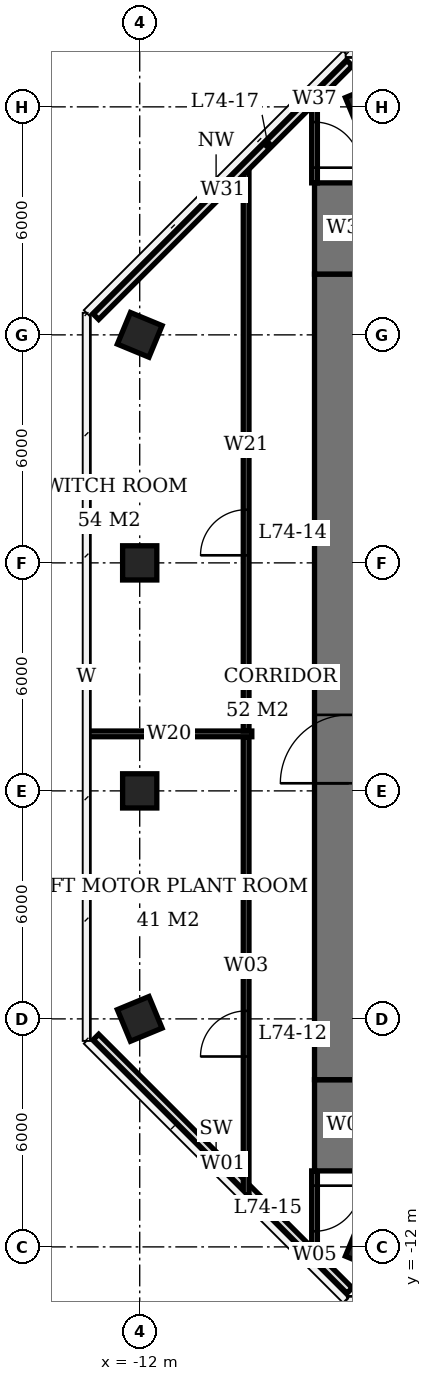
"""IFC4 building model, lengths in metres.
Left out: names, types, materials, properties, quantities, classifications, styles, units other than length and angle.
Written with IfcOpenShell. Run it as: python <this file> out.ifc"""

import sys

from ifc_helpers import new_model, si_unit, direction, frame, frame_2d, origin, origin_2d, place, context, subcontext, project, spatial, rectangle, extrude, element, fill, save


model = new_model("IFC4")
c1 = context("Model", 3, precision=1e-05, world=origin(), true_north=direction((0.0, 1.0)))
c2 = subcontext(c1, "Body", "Model", "MODEL_VIEW")
j1 = project(units=[si_unit("LENGTHUNIT", "METRE"), si_unit("PLANEANGLEUNIT", "RADIAN")], contexts=[c1])
p1 = place(None, origin())
s1 = spatial("IfcSite", under=j1, at=p1, CompositionType="ELEMENT")
p2 = place(p1, origin())
s2 = spatial("IfcBuilding", under=s1, at=p2, CompositionType="ELEMENT")
p3 = place(p2, frame((0.0, 0.0, 300.7)))
s3 = spatial("IfcBuildingStorey", under=s2, at=p3, CompositionType="ELEMENT", Elevation=300.7)
for number, where, z_axis, x_axis in (
    (1, (-12.0, -6.0, 0.0), (0.0, 0.0, 1.0), (-0.383, 0.924, 0.0)),
    (2, (-12.0, 0.0, 0.0), (0.0, 0.0, 1.0), (0.0, 1.0, 0.0)),
    (3, (-12.0, 6.0, 0.0), (0.0, 0.0, 1.0), (0.0, 1.0, 0.0)),
    (4, (-12.0, 12.0, 0.0), (0.0, 0.0, 1.0), (0.383, 0.924, 0.0)),
    (5, (-6.0, -12.0, 0.0), (0.0, 0.0, 1.0), (-0.924, 0.383, 0.0)),
    (6, (-6.0, 18.0, 0.0), (0.0, 0.0, 1.0), (0.924, 0.383, 0.0)),
):
    element("IfcColumn", number, at=place(p3, frame(where, z_axis=z_axis, x_axis=x_axis)), inside=s3, PredefinedType="COLUMN", context=c2, shape_type="SweptSolid", body=[
        extrude(rectangle(XDim=0.9, YDim=0.9, at=origin_2d()), origin(), (0.0, 0.0, 1.0), 5.0),
    ])
p4 = place(p3, frame((-6.5, -7.6, 0.0), z_axis=(0.0, 0.0, 1.0), x_axis=(0.0, 1.0, 0.0)))
e7 = element("IfcWall", 7, at=p4, inside=s3, PredefinedType="SHEAR", context=c2, shape_type="SweptSolid", body=[
    extrude(rectangle(XDim=21.2, YDim=1.8, at=frame_2d((10.6, 0.0))), origin(), (0.0, 0.0, 1.0), 5.0),
])
p5 = place(p4, frame((7.8, 0.0, 0.0)))
e8 = element("IfcOpeningElement", 8, at=p5, cuts=e7, PredefinedType="OPENING", context=c2, shape_type="SweptSolid", body=[
    extrude(rectangle(XDim=1.8, YDim=2.4, at=frame_2d((0.9, 1.2))), frame((0.0, 0.91, 0.0), z_axis=(0.0, -1.0, 0.0), x_axis=(1.0, 0.0, 0.0)), (0.0, 0.0, 1.0), 1.82),
])
for number, where, z_axis, x_axis in (
    (9, (-6.5, -10.0, 0.0), (0.0, 0.0, 1.0), (0.0, 1.0, 0.0)),
    (10, (-6.5, 13.6, 0.0), (0.0, 0.0, 1.0), (0.0, 1.0, 0.0)),
):
    element("IfcWall", number, at=place(p3, frame(where, z_axis=z_axis, x_axis=x_axis)), inside=s3, PredefinedType="SHEAR", context=c2, shape_type="SweptSolid", body=[
        extrude(rectangle(XDim=2.4, YDim=1.8, at=frame_2d((1.2, 0.0))), origin(), (0.0, 0.0, 1.0), 5.0),
    ])
for number, where, z_axis, x_axis in (
    (11, (-13.15, 12.476, 6.1), (0.0, 0.0, 1.0), (0.707, 0.707, 0.0)),
    (12, (-6.476, -13.15, 6.1), (0.0, 0.0, 1.0), (-0.707, 0.707, 0.0)),
):
    element("IfcWall", number, at=place(p3, frame(where, z_axis=z_axis, x_axis=x_axis)), inside=s3, PredefinedType="USERDEFINED", context=c2, shape_type="SweptSolid", body=[
        extrude(rectangle(XDim=9.438, YDim=0.2, at=frame_2d((4.719, 0.0))), origin(), (0.0, 0.0, 1.0), 1.9),
    ])
p6 = place(p3, frame((-13.4, 1.5, 0.0), z_axis=(0.0, 0.0, 1.0), x_axis=(1.0, 0.0, 0.0)))
e13 = element("IfcWall", 13, at=p6, inside=s3, PredefinedType="PARTITIONING", context=c2, shape_type="SweptSolid", body=[
    extrude(rectangle(XDim=4.35, YDim=0.15, at=frame_2d((2.175, 0.0))), origin(), (0.0, 0.0, 1.0), 4.75),
])
p7 = place(p3, frame((-9.2, -10.639, 0.0), z_axis=(0.0, 0.0, 1.0), x_axis=(0.0, 1.0, 0.0)))
e14 = element("IfcWall", 14, at=p7, inside=s3, PredefinedType="PARTITIONING", context=c2, shape_type="SweptSolid", body=[
    extrude(rectangle(XDim=12.064, YDim=0.15, at=frame_2d((6.032, 0.0))), origin(), (0.0, 0.0, 1.0), 4.75),
])
p8 = place(p7, frame((3.649, 0.0, 0.0)))
e15 = element("IfcOpeningElement", 15, at=p8, cuts=e14, PredefinedType="OPENING", context=c2, shape_type="SweptSolid", body=[
    extrude(rectangle(XDim=1.2, YDim=2.4, at=frame_2d((0.6, 1.2))), frame((0.0, 0.085, 0.0), z_axis=(0.0, -1.0, 0.0), x_axis=(1.0, 0.0, 0.0)), (0.0, 0.0, 1.0), 0.17),
])
p9 = place(p3, frame((-9.2, 1.575, 0.0), z_axis=(0.0, 0.0, 1.0), x_axis=(0.0, 1.0, 0.0)))
e16 = element("IfcWall", 16, at=p9, inside=s3, PredefinedType="PARTITIONING", context=c2, shape_type="SweptSolid", body=[
    extrude(rectangle(XDim=15.064, YDim=0.15, at=frame_2d((7.532, 0.0))), origin(), (0.0, 0.0, 1.0), 4.75),
])
p10 = place(p9, frame((4.624, 0.0, 0.0)))
e17 = element("IfcOpeningElement", 17, at=p10, cuts=e16, PredefinedType="OPENING", context=c2, shape_type="SweptSolid", body=[
    extrude(rectangle(XDim=1.2, YDim=2.4, at=frame_2d((0.6, 1.2))), frame((0.0, 0.085, 0.0), z_axis=(0.0, -1.0, 0.0), x_axis=(1.0, 0.0, 0.0)), (0.0, 0.0, 1.0), 0.17),
])
p11 = place(p3, frame((-7.4, -10.0, 0.0), z_axis=(0.0, 0.0, 1.0), x_axis=(0.0, -1.0, 0.0)))
e18 = element("IfcWall", 18, at=p11, inside=s3, PredefinedType="PARTITIONING", context=c2, shape_type="SweptSolid", body=[
    extrude(rectangle(XDim=2.439, YDim=0.15, at=frame_2d((1.219, 0.0))), origin(), (0.0, 0.0, 1.0), 4.75),
])
p12 = place(p11, frame((0.389, 0.0, 0.0)))
e19 = element("IfcOpeningElement", 19, at=p12, cuts=e18, PredefinedType="OPENING", context=c2, shape_type="SweptSolid", body=[
    extrude(rectangle(XDim=1.2, YDim=2.4, at=frame_2d((0.6, 1.2))), frame((0.0, 0.085, 0.0), z_axis=(0.0, -1.0, 0.0), x_axis=(1.0, 0.0, 0.0)), (0.0, 0.0, 1.0), 0.17),
])
p13 = place(p3, frame((-7.4, 18.439, 0.0), z_axis=(0.0, 0.0, 1.0), x_axis=(0.0, -1.0, 0.0)))
e20 = element("IfcWall", 20, at=p13, inside=s3, PredefinedType="PARTITIONING", context=c2, shape_type="SweptSolid", body=[
    extrude(rectangle(XDim=2.439, YDim=0.15, at=frame_2d((1.219, 0.0))), origin(), (0.0, 0.0, 1.0), 4.75),
])
p14 = place(p13, frame((0.839, 0.0, 0.0)))
e21 = element("IfcOpeningElement", 21, at=p14, cuts=e20, PredefinedType="OPENING", context=c2, shape_type="SweptSolid", body=[
    extrude(rectangle(XDim=1.2, YDim=2.4, at=frame_2d((0.6, 1.2))), frame((0.0, 0.085, 0.0), z_axis=(0.0, -1.0, 0.0), x_axis=(1.0, 0.0, 0.0)), (0.0, 0.0, 1.0), 0.17),
])
p15 = place(p5, origin())
e22 = element("IfcDoor", 22, at=p15, inside=s3, OperationType="DOUBLE_DOOR_SINGLE_SWING", PredefinedType="DOOR", context=c2, shape_type="SweptSolid", body=[
    extrude(rectangle(XDim=1.8, YDim=2.4, at=frame_2d((0.9, 1.2))), frame((0.0, 0.025, 0.0), z_axis=(0.0, -1.0, 0.0), x_axis=(1.0, 0.0, 0.0)), (0.0, 0.0, 1.0), 0.05),
])
fill(e8, e22)
p16 = place(p8, origin())
e23 = element("IfcDoor", 23, at=p16, inside=s3, OperationType="SINGLE_SWING_LEFT", PredefinedType="DOOR", context=c2, shape_type="SweptSolid", body=[
    extrude(rectangle(XDim=1.2, YDim=2.4, at=frame_2d((0.6, 1.2))), frame((0.0, 0.025, 0.0), z_axis=(0.0, -1.0, 0.0), x_axis=(1.0, 0.0, 0.0)), (0.0, 0.0, 1.0), 0.05),
])
fill(e15, e23)
p17 = place(p10, origin())
e24 = element("IfcDoor", 24, at=p17, inside=s3, OperationType="SINGLE_SWING_LEFT", PredefinedType="DOOR", context=c2, shape_type="SweptSolid", body=[
    extrude(rectangle(XDim=1.2, YDim=2.4, at=frame_2d((0.6, 1.2))), frame((0.0, 0.025, 0.0), z_axis=(0.0, -1.0, 0.0), x_axis=(1.0, 0.0, 0.0)), (0.0, 0.0, 1.0), 0.05),
])
fill(e17, e24)
p18 = place(p12, origin())
e25 = element("IfcDoor", 25, at=p18, inside=s3, OperationType="SINGLE_SWING_LEFT", PredefinedType="DOOR", context=c2, shape_type="SweptSolid", body=[
    extrude(rectangle(XDim=1.2, YDim=2.4, at=frame_2d((0.6, 1.2))), frame((0.0, 0.025, 0.0), z_axis=(0.0, -1.0, 0.0), x_axis=(1.0, 0.0, 0.0)), (0.0, 0.0, 1.0), 0.05),
])
fill(e19, e25)
p19 = place(p14, origin())
e26 = element("IfcDoor", 26, at=p19, inside=s3, OperationType="SINGLE_SWING_RIGHT", PredefinedType="DOOR", context=c2, shape_type="SweptSolid", body=[
    extrude(rectangle(XDim=1.2, YDim=2.4, at=frame_2d((0.6, 1.2))), frame((0.0, 0.025, 0.0), z_axis=(0.0, -1.0, 0.0), x_axis=(1.0, 0.0, 0.0)), (0.0, 0.0, 1.0), 0.05),
])
fill(e21, e26)
save(model, sys.argv[1])
